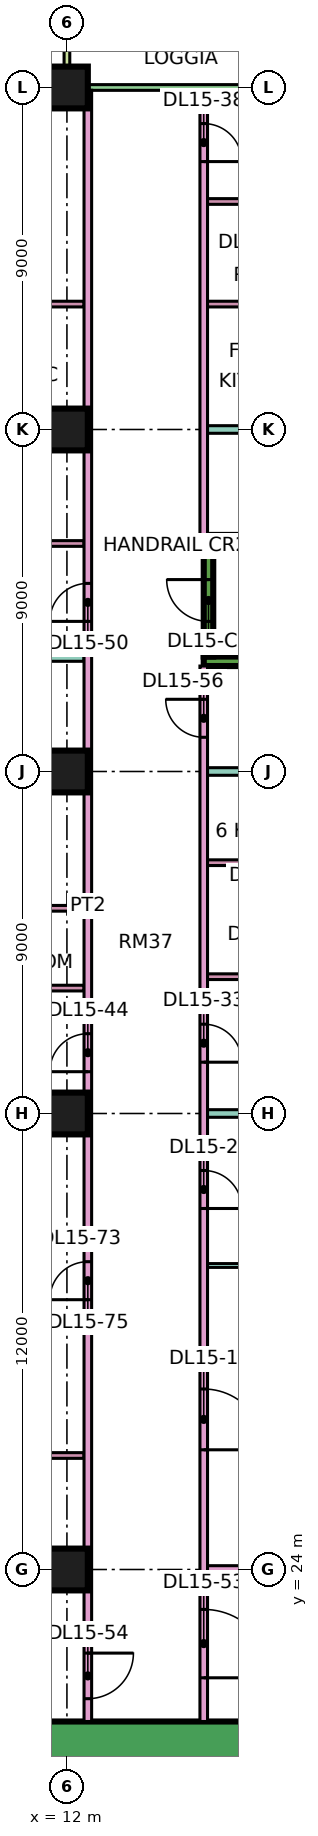
"""IFC4 building model, lengths in metres.
Left out: names, types, materials, properties, quantities, classifications, styles, units other than length and angle.
Written with IfcOpenShell. Run it as: python <this file> out.ifc"""

import sys

from ifc_helpers import new_model, si_unit, direction, frame, frame_2d, origin, origin_2d, place, context, subcontext, project, spatial, rectangle, extrude, element, fill, save


model = new_model("IFC4")
c1 = context("Model", 3, precision=1e-05, world=origin(), true_north=direction((0.0, 1.0)))
c2 = subcontext(c1, "Body", "Model", "MODEL_VIEW")
j1 = project(units=[si_unit("LENGTHUNIT", "METRE"), si_unit("PLANEANGLEUNIT", "RADIAN")], contexts=[c1])
p1 = place(None, origin())
s1 = spatial("IfcSite", under=j1, at=p1, CompositionType="ELEMENT")
p2 = place(p1, origin())
s2 = spatial("IfcBuilding", under=s1, at=p2, CompositionType="ELEMENT")
p3 = place(p2, frame((0.0, 0.0, 71.4)))
s3 = spatial("IfcBuildingStorey", under=s2, at=p3, CompositionType="ELEMENT", Elevation=71.4)
for number, where, z_axis, x_axis in (
    (1, (12.0, 24.0, 0.0), (0.0, 0.0, 1.0), (1.0, 0.0, 0.0)),
    (2, (12.0, 36.0, 0.0), (0.0, 0.0, 1.0), (1.0, 0.0, 0.0)),
    (3, (12.0, 45.0, 0.0), (0.0, 0.0, 1.0), (1.0, 0.0, 0.0)),
    (4, (12.0, 54.0, 0.0), (0.0, 0.0, 1.0), (1.0, 0.0, 0.0)),
    (5, (12.0, 63.0, 0.0), (0.0, 0.0, 1.0), (1.0, 0.0, 0.0)),
):
    element("IfcColumn", number, at=place(p3, frame(where, z_axis=z_axis, x_axis=x_axis)), inside=s3, PredefinedType="COLUMN", context=c2, shape_type="SweptSolid", body=[
        extrude(rectangle(XDim=1.1, YDim=1.1, at=origin_2d()), origin(), (0.0, 0.0, 1.0), 3.75),
    ])
p4 = place(p3, frame((9.0, 19.45, 0.0), z_axis=(0.0, 0.0, 1.0), x_axis=(1.0, 0.0, 0.0)))
e6 = element("IfcWall", 6, at=p4, inside=s3, PredefinedType="SHEAR", context=c2, shape_type="SweptSolid", body=[
    extrude(rectangle(XDim=25.0, YDim=1.1, at=frame_2d((12.5, 0.0))), origin(), (0.0, 0.0, 1.0), 3.75),
])
p5 = place(p4, frame((19.1, 0.0, 0.0)))
e7 = element("IfcOpeningElement", 7, at=p5, cuts=e6, PredefinedType="OPENING", context=c2, shape_type="SweptSolid", body=[
    extrude(rectangle(XDim=1.8, YDim=2.4, at=frame_2d((0.9, 1.2))), frame((0.0, 0.56, 0.0), z_axis=(0.0, -1.0, 0.0), x_axis=(1.0, 0.0, 0.0)), (0.0, 0.0, 1.0), 1.12),
])
for number, where, z_axis, x_axis in (
    (8, (15.6, 47.9, 0.0), (0.0, 0.0, 1.0), (1.0, 0.0, 0.0)),
    (9, (15.6, 51.1, 0.0), (0.0, 0.0, 1.0), (1.0, 0.0, 0.0)),
):
    element("IfcWall", number, at=place(p3, frame(where, z_axis=z_axis, x_axis=x_axis)), inside=s3, PredefinedType="SHEAR", context=c2, shape_type="SweptSolid", body=[
        extrude(rectangle(XDim=7.0, YDim=0.25, at=frame_2d((3.5, 0.0))), origin(), (0.0, 0.0, 1.0), 3.75),
    ])
p6 = place(p3, frame((15.725, 48.025, 0.0), z_axis=(0.0, 0.0, 1.0), x_axis=(0.0, 1.0, 0.0)))
e10 = element("IfcWall", 10, at=p6, inside=s3, PredefinedType="SHEAR", context=c2, shape_type="SweptSolid", body=[
    extrude(rectangle(XDim=2.95, YDim=0.25, at=frame_2d((1.475, 0.0))), origin(), (0.0, 0.0, 1.0), 3.75),
])
p7 = place(p6, frame((0.925, 0.0, 0.0)))
e11 = element("IfcOpeningElement", 11, at=p7, cuts=e10, PredefinedType="OPENING", context=c2, shape_type="SweptSolid", body=[
    extrude(rectangle(XDim=1.1, YDim=2.2, at=frame_2d((0.55, 1.1))), frame((0.0, 0.135, 0.0), z_axis=(0.0, -1.0, 0.0), x_axis=(1.0, 0.0, 0.0)), (0.0, 0.0, 1.0), 0.27),
])
p8 = place(p3, frame((22.425, 63.0, 0.0), z_axis=(0.0, 0.0, 1.0), x_axis=(-1.0, 0.0, 0.0)))
e12 = element("IfcWall", 12, at=p8, inside=s3, PredefinedType="SOLIDWALL", context=c2, shape_type="SweptSolid", body=[
    extrude(rectangle(XDim=10.35, YDim=0.15, at=frame_2d((5.175, 0.0))), origin(), (0.0, 0.0, 1.0), 3.35),
])
p9 = place(p8, frame((2.512, 0.0, 0.0)))
e13 = element("IfcOpeningElement", 13, at=p9, cuts=e12, PredefinedType="OPENING", context=c2, shape_type="SweptSolid", body=[
    extrude(rectangle(XDim=1.8, YDim=2.4, at=frame_2d((0.9, 1.2))), frame((0.0, 0.085, 0.0), z_axis=(0.0, -1.0, 0.0), x_axis=(1.0, 0.0, 0.0)), (0.0, 0.0, 1.0), 0.17),
])
p10 = place(p3, frame((12.0, 64.5, 0.0), z_axis=(0.0, 0.0, 1.0), x_axis=(0.0, -1.0, 0.0)))
e14 = element("IfcWall", 14, at=p10, inside=s3, PredefinedType="SOLIDWALL", context=c2, shape_type="SweptSolid", body=[
    extrude(rectangle(XDim=1.5, YDim=0.15, at=frame_2d((0.75, 0.0))), origin(), (0.0, 0.0, 1.0), 3.35),
])
p11 = place(p3, frame((0.0, 36.0, 0.0), z_axis=(0.0, 0.0, 1.0), x_axis=(1.0, 0.0, 0.0)))
e15 = element("IfcWall", 15, at=p11, inside=s3, PredefinedType="PARTITIONING", context=c2, shape_type="SweptSolid", body=[
    extrude(rectangle(XDim=12.45, YDim=0.2, at=frame_2d((6.225, 0.0))), origin(), (0.0, 0.0, 1.0), 3.35),
])
p12 = place(p3, frame((0.0, 48.0, 0.0), z_axis=(0.0, 0.0, 1.0), x_axis=(1.0, 0.0, 0.0)))
e16 = element("IfcWall", 16, at=p12, inside=s3, PredefinedType="PARTITIONING", context=c2, shape_type="SweptSolid", body=[
    extrude(rectangle(XDim=12.45, YDim=0.2, at=frame_2d((6.225, 0.0))), origin(), (0.0, 0.0, 1.0), 3.35),
])
p13 = place(p3, frame((0.074, 22.4, 0.0), z_axis=(0.0, 0.0, 1.0), x_axis=(1.0, 0.0, 0.0)))
e17 = element("IfcWall", 17, at=p13, inside=s3, PredefinedType="PARTITIONING", context=c2, shape_type="SweptSolid", body=[
    extrude(rectangle(XDim=12.376, YDim=0.2, at=frame_2d((6.188, 0.0))), origin(), (0.0, 0.0, 1.0), 3.35),
])
p14 = place(p3, frame((7.7, 32.7, 0.0), z_axis=(0.0, 0.0, 1.0), x_axis=(1.0, 0.0, 0.0)))
e18 = element("IfcWall", 18, at=p14, inside=s3, PredefinedType="PARTITIONING", context=c2, shape_type="SweptSolid", body=[
    extrude(rectangle(XDim=4.75, YDim=0.1, at=frame_2d((2.375, 0.0))), origin(), (0.0, 0.0, 1.0), 3.35),
])
p15 = place(p14, frame((2.0, 0.0, 0.0)))
e19 = element("IfcOpeningElement", 19, at=p15, cuts=e18, PredefinedType="OPENING", context=c2, shape_type="SweptSolid", body=[
    extrude(rectangle(XDim=0.9, YDim=2.1, at=frame_2d((0.45, 1.05))), frame((0.0, 0.06, 0.0), z_axis=(0.0, -1.0, 0.0), x_axis=(1.0, 0.0, 0.0)), (0.0, 0.0, 1.0), 0.12),
])
p16 = place(p3, frame((7.825, 27.0, 0.0), z_axis=(0.0, 0.0, 1.0), x_axis=(1.0, 0.0, 0.0)))
e20 = element("IfcWall", 20, at=p16, inside=s3, PredefinedType="PARTITIONING", context=c2, shape_type="SweptSolid", body=[
    extrude(rectangle(XDim=4.625, YDim=0.15, at=frame_2d((2.312, 0.0))), origin(), (0.0, 0.0, 1.0), 3.35),
])
p17 = place(p3, frame((7.825, 30.6, 0.0), z_axis=(0.0, 0.0, 1.0), x_axis=(1.0, 0.0, 0.0)))
e21 = element("IfcWall", 21, at=p17, inside=s3, PredefinedType="PARTITIONING", context=c2, shape_type="SweptSolid", body=[
    extrude(rectangle(XDim=4.625, YDim=0.15, at=frame_2d((2.312, 0.0))), origin(), (0.0, 0.0, 1.0), 3.35),
])
p18 = place(p17, frame((1.875, 0.0, 0.0)))
e22 = element("IfcOpeningElement", 22, at=p18, cuts=e21, PredefinedType="OPENING", context=c2, shape_type="SweptSolid", body=[
    extrude(rectangle(XDim=0.8, YDim=2.1, at=frame_2d((0.4, 1.05))), frame((0.0, 0.085, 0.0), z_axis=(0.0, -1.0, 0.0), x_axis=(1.0, 0.0, 0.0)), (0.0, 0.0, 1.0), 0.17),
])
for number, where, z_axis, x_axis in (
    (23, (7.825, 51.0, 0.0), (0.0, 0.0, 1.0), (1.0, 0.0, 0.0)),
    (24, (7.825, 54.3, 0.0), (0.0, 0.0, 1.0), (1.0, 0.0, 0.0)),
    (25, (7.825, 57.3, 0.0), (0.0, 0.0, 1.0), (1.0, 0.0, 0.0)),
):
    element("IfcWall", number, at=place(p3, frame(where, z_axis=z_axis, x_axis=x_axis)), inside=s3, PredefinedType="PARTITIONING", context=c2, shape_type="SweptSolid", body=[
        extrude(rectangle(XDim=4.625, YDim=0.15, at=frame_2d((2.312, 0.0))), origin(), (0.0, 0.0, 1.0), 3.35),
    ])
p19 = place(p3, frame((8.425, 39.3, 0.0), z_axis=(0.0, 0.0, 1.0), x_axis=(1.0, 0.0, 0.0)))
e26 = element("IfcWall", 26, at=p19, inside=s3, PredefinedType="PARTITIONING", context=c2, shape_type="SweptSolid", body=[
    extrude(rectangle(XDim=4.025, YDim=0.15, at=frame_2d((2.012, 0.0))), origin(), (0.0, 0.0, 1.0), 3.35),
])
p20 = place(p19, frame((1.675, 0.0, 0.0)))
e27 = element("IfcOpeningElement", 27, at=p20, cuts=e26, PredefinedType="OPENING", context=c2, shape_type="SweptSolid", body=[
    extrude(rectangle(XDim=0.8, YDim=2.1, at=frame_2d((0.4, 1.05))), frame((0.0, 0.085, 0.0), z_axis=(0.0, -1.0, 0.0), x_axis=(1.0, 0.0, 0.0)), (0.0, 0.0, 1.0), 0.17),
])
p21 = place(p3, frame((8.425, 41.4, 0.0), z_axis=(0.0, 0.0, 1.0), x_axis=(1.0, 0.0, 0.0)))
e28 = element("IfcWall", 28, at=p21, inside=s3, PredefinedType="PARTITIONING", context=c2, shape_type="SweptSolid", body=[
    extrude(rectangle(XDim=4.025, YDim=0.15, at=frame_2d((2.012, 0.0))), origin(), (0.0, 0.0, 1.0), 3.35),
])
p22 = place(p3, frame((12.55, 20.0, 0.0), z_axis=(0.0, 0.0, 1.0), x_axis=(0.0, 1.0, 0.0)))
e29 = element("IfcWall", 29, at=p22, inside=s3, PredefinedType="PARTITIONING", context=c2, shape_type="SweptSolid", body=[
    extrude(rectangle(XDim=42.926, YDim=0.2, at=frame_2d((21.463, 0.0))), origin(), (0.0, 0.0, 1.0), 3.35),
])
p23 = place(p22, frame((17.1, 0.0, 0.0)))
e30 = element("IfcOpeningElement", 30, at=p23, cuts=e29, PredefinedType="OPENING", context=c2, shape_type="SweptSolid", body=[
    extrude(rectangle(XDim=1.0, YDim=2.1, at=frame_2d((0.5, 1.05))), frame((0.0, 0.11, 0.0), z_axis=(0.0, -1.0, 0.0), x_axis=(1.0, 0.0, 0.0)), (0.0, 0.0, 1.0), 0.22),
])
p24 = place(p22, frame((28.95, 0.0, 0.0)))
e31 = element("IfcOpeningElement", 31, at=p24, cuts=e29, PredefinedType="OPENING", context=c2, shape_type="SweptSolid", body=[
    extrude(rectangle(XDim=1.0, YDim=2.1, at=frame_2d((0.5, 1.05))), frame((0.0, 0.11, 0.0), z_axis=(0.0, -1.0, 0.0), x_axis=(1.0, 0.0, 0.0)), (0.0, 0.0, 1.0), 0.22),
])
p25 = place(p22, frame((0.6, 0.0, 0.0)))
e32 = element("IfcOpeningElement", 32, at=p25, cuts=e29, PredefinedType="OPENING", context=c2, shape_type="SweptSolid", body=[
    extrude(rectangle(XDim=1.2, YDim=2.1, at=frame_2d((0.6, 1.05))), frame((0.0, 0.11, 0.0), z_axis=(0.0, -1.0, 0.0), x_axis=(1.0, 0.0, 0.0)), (0.0, 0.0, 1.0), 0.22),
])
p26 = place(p22, frame((11.1, 0.0, 0.0)))
e33 = element("IfcOpeningElement", 33, at=p26, cuts=e29, PredefinedType="OPENING", context=c2, shape_type="SweptSolid", body=[
    extrude(rectangle(XDim=1.0, YDim=2.1, at=frame_2d((0.5, 1.05))), frame((0.0, 0.11, 0.0), z_axis=(0.0, -1.0, 0.0), x_axis=(1.0, 0.0, 0.0)), (0.0, 0.0, 1.0), 0.22),
])
p27 = place(p3, frame((15.6, 20.0, 0.0), z_axis=(0.0, 0.0, 1.0), x_axis=(0.0, 1.0, 0.0)))
e34 = element("IfcWall", 34, at=p27, inside=s3, PredefinedType="PARTITIONING", context=c2, shape_type="SweptSolid", body=[
    extrude(rectangle(XDim=27.775, YDim=0.2, at=frame_2d((13.887, 0.0))), origin(), (0.0, 0.0, 1.0), 3.35),
])
p28 = place(p27, frame((7.15, 0.0, 0.0)))
e35 = element("IfcOpeningElement", 35, at=p28, cuts=e34, PredefinedType="OPENING", context=c2, shape_type="SweptSolid", body=[
    extrude(rectangle(XDim=1.6, YDim=2.1, at=frame_2d((0.8, 1.05))), frame((0.0, 0.11, 0.0), z_axis=(0.0, -1.0, 0.0), x_axis=(1.0, 0.0, 0.0)), (0.0, 0.0, 1.0), 0.22),
])
p29 = place(p27, frame((13.5, 0.0, 0.0)))
e36 = element("IfcOpeningElement", 36, at=p29, cuts=e34, PredefinedType="OPENING", context=c2, shape_type="SweptSolid", body=[
    extrude(rectangle(XDim=1.0, YDim=2.1, at=frame_2d((0.5, 1.05))), frame((0.0, 0.11, 0.0), z_axis=(0.0, -1.0, 0.0), x_axis=(1.0, 0.0, 0.0)), (0.0, 0.0, 1.0), 0.22),
])
p30 = place(p27, frame((17.35, 0.0, 0.0)))
e37 = element("IfcOpeningElement", 37, at=p30, cuts=e34, PredefinedType="OPENING", context=c2, shape_type="SweptSolid", body=[
    extrude(rectangle(XDim=1.0, YDim=2.1, at=frame_2d((0.5, 1.05))), frame((0.0, 0.11, 0.0), z_axis=(0.0, -1.0, 0.0), x_axis=(1.0, 0.0, 0.0)), (0.0, 0.0, 1.0), 0.22),
])
p31 = place(p27, frame((1.15, 0.0, 0.0)))
e38 = element("IfcOpeningElement", 38, at=p31, cuts=e34, PredefinedType="OPENING", context=c2, shape_type="SweptSolid", body=[
    extrude(rectangle(XDim=1.8, YDim=2.1, at=frame_2d((0.9, 1.05))), frame((0.0, 0.11, 0.0), z_axis=(0.0, -1.0, 0.0), x_axis=(1.0, 0.0, 0.0)), (0.0, 0.0, 1.0), 0.22),
])
p32 = place(p27, frame((25.9, 0.0, 0.0)))
e39 = element("IfcOpeningElement", 39, at=p32, cuts=e34, PredefinedType="OPENING", context=c2, shape_type="SweptSolid", body=[
    extrude(rectangle(XDim=1.0, YDim=2.1, at=frame_2d((0.5, 1.05))), frame((0.0, 0.11, 0.0), z_axis=(0.0, -1.0, 0.0), x_axis=(1.0, 0.0, 0.0)), (0.0, 0.0, 1.0), 0.22),
])
p33 = place(p3, frame((15.6, 51.225, 0.0), z_axis=(0.0, 0.0, 1.0), x_axis=(0.0, 1.0, 0.0)))
e40 = element("IfcWall", 40, at=p33, inside=s3, PredefinedType="PARTITIONING", context=c2, shape_type="SweptSolid", body=[
    extrude(rectangle(XDim=11.701, YDim=0.2, at=frame_2d((5.851, 0.0))), origin(), (0.0, 0.0, 1.0), 3.35),
])
p34 = place(p33, frame((9.825, 0.0, 0.0)))
e41 = element("IfcOpeningElement", 41, at=p34, cuts=e40, PredefinedType="OPENING", context=c2, shape_type="SweptSolid", body=[
    extrude(rectangle(XDim=1.0, YDim=2.1, at=frame_2d((0.5, 1.05))), frame((0.0, 0.11, 0.0), z_axis=(0.0, -1.0, 0.0), x_axis=(1.0, 0.0, 0.0)), (0.0, 0.0, 1.0), 0.22),
])
p35 = place(p3, frame((15.7, 24.0, 0.0), z_axis=(0.0, 0.0, 1.0), x_axis=(1.0, 0.0, 0.0)))
e42 = element("IfcWall", 42, at=p35, inside=s3, PredefinedType="PARTITIONING", context=c2, shape_type="SweptSolid", body=[
    extrude(rectangle(XDim=5.8, YDim=0.2, at=frame_2d((2.9, 0.0))), origin(), (0.0, 0.0, 1.0), 3.35),
])
p36 = place(p3, frame((15.7, 32.0, 0.0), z_axis=(0.0, 0.0, 1.0), x_axis=(1.0, 0.0, 0.0)))
e43 = element("IfcWall", 43, at=p36, inside=s3, PredefinedType="PARTITIONING", context=c2, shape_type="SweptSolid", body=[
    extrude(rectangle(XDim=5.8, YDim=0.1, at=frame_2d((2.9, 0.0))), origin(), (0.0, 0.0, 1.0), 3.35),
])
p37 = place(p3, frame((15.7, 36.0, 0.0), z_axis=(0.0, 0.0, 1.0), x_axis=(1.0, 0.0, 0.0)))
e44 = element("IfcWall", 44, at=p37, inside=s3, PredefinedType="PARTITIONING", context=c2, shape_type="SweptSolid", body=[
    extrude(rectangle(XDim=8.3, YDim=0.2, at=frame_2d((4.15, 0.0))), origin(), (0.0, 0.0, 1.0), 3.35),
])
p38 = place(p3, frame((15.7, 39.6, 0.0), z_axis=(0.0, 0.0, 1.0), x_axis=(1.0, 0.0, 0.0)))
e45 = element("IfcWall", 45, at=p38, inside=s3, PredefinedType="PARTITIONING", context=c2, shape_type="SweptSolid", body=[
    extrude(rectangle(XDim=3.125, YDim=0.15, at=frame_2d((1.562, 0.0))), origin(), (0.0, 0.0, 1.0), 3.35),
])
p39 = place(p38, frame((1.2, 0.0, 0.0)))
e46 = element("IfcOpeningElement", 46, at=p39, cuts=e45, PredefinedType="OPENING", context=c2, shape_type="SweptSolid", body=[
    extrude(rectangle(XDim=0.8, YDim=2.1, at=frame_2d((0.4, 1.05))), frame((0.0, 0.085, 0.0), z_axis=(0.0, -1.0, 0.0), x_axis=(1.0, 0.0, 0.0)), (0.0, 0.0, 1.0), 0.17),
])
p40 = place(p3, frame((15.7, 42.6, 0.0), z_axis=(0.0, 0.0, 1.0), x_axis=(1.0, 0.0, 0.0)))
e47 = element("IfcWall", 47, at=p40, inside=s3, PredefinedType="PARTITIONING", context=c2, shape_type="SweptSolid", body=[
    extrude(rectangle(XDim=3.125, YDim=0.15, at=frame_2d((1.562, 0.0))), origin(), (0.0, 0.0, 1.0), 3.35),
])
p41 = place(p3, frame((15.7, 45.0, 0.0), z_axis=(0.0, 0.0, 1.0), x_axis=(1.0, 0.0, 0.0)))
e48 = element("IfcWall", 48, at=p41, inside=s3, PredefinedType="PARTITIONING", context=c2, shape_type="SweptSolid", body=[
    extrude(rectangle(XDim=8.226, YDim=0.2, at=frame_2d((4.113, 0.0))), origin(), (0.0, 0.0, 1.0), 3.35),
])
p42 = place(p3, frame((15.7, 54.0, 0.0), z_axis=(0.0, 0.0, 1.0), x_axis=(1.0, 0.0, 0.0)))
e49 = element("IfcWall", 49, at=p42, inside=s3, PredefinedType="PARTITIONING", context=c2, shape_type="SweptSolid", body=[
    extrude(rectangle(XDim=8.3, YDim=0.2, at=frame_2d((4.15, 0.0))), origin(), (0.0, 0.0, 1.0), 3.35),
])
p43 = place(p3, frame((15.7, 57.3, 0.0), z_axis=(0.0, 0.0, 1.0), x_axis=(1.0, 0.0, 0.0)))
e50 = element("IfcWall", 50, at=p43, inside=s3, PredefinedType="PARTITIONING", context=c2, shape_type="SweptSolid", body=[
    extrude(rectangle(XDim=2.825, YDim=0.15, at=frame_2d((1.413, 0.0))), origin(), (0.0, 0.0, 1.0), 3.35),
])
p44 = place(p3, frame((15.7, 60.0, 0.0), z_axis=(0.0, 0.0, 1.0), x_axis=(1.0, 0.0, 0.0)))
e51 = element("IfcWall", 51, at=p44, inside=s3, PredefinedType="PARTITIONING", context=c2, shape_type="SweptSolid", body=[
    extrude(rectangle(XDim=2.825, YDim=0.15, at=frame_2d((1.413, 0.0))), origin(), (0.0, 0.0, 1.0), 3.35),
])
p45 = place(p44, frame((0.95, 0.0, 0.0)))
e52 = element("IfcOpeningElement", 52, at=p45, cuts=e51, PredefinedType="OPENING", context=c2, shape_type="SweptSolid", body=[
    extrude(rectangle(XDim=0.8, YDim=2.1, at=frame_2d((0.4, 1.05))), frame((0.0, 0.085, 0.0), z_axis=(0.0, -1.0, 0.0), x_axis=(1.0, 0.0, 0.0)), (0.0, 0.0, 1.0), 0.17),
])
p46 = place(p7, frame((1.1, 0.0, 0.0), z_axis=(0.0, 0.0, 1.0), x_axis=(-1.0, 0.0, 0.0)))
e53 = element("IfcDoor", 53, at=p46, inside=s3, OperationType="SINGLE_SWING_RIGHT", PredefinedType="DOOR", context=c2, shape_type="SweptSolid", body=[
    extrude(rectangle(XDim=1.1, YDim=2.2, at=frame_2d((0.55, 1.1))), frame((0.0, 0.025, 0.0), z_axis=(0.0, -1.0, 0.0), x_axis=(1.0, 0.0, 0.0)), (0.0, 0.0, 1.0), 0.05),
])
fill(e11, e53)
p47 = place(p28, frame((1.6, 0.0, 0.0), z_axis=(0.0, 0.0, 1.0), x_axis=(-1.0, 0.0, 0.0)))
e54 = element("IfcDoor", 54, at=p47, inside=s3, OperationType="DOUBLE_DOOR_SINGLE_SWING", PredefinedType="DOOR", context=c2, shape_type="SweptSolid", body=[
    extrude(rectangle(XDim=1.6, YDim=2.1, at=frame_2d((0.8, 1.05))), frame((0.0, 0.025, 0.0), z_axis=(0.0, -1.0, 0.0), x_axis=(1.0, 0.0, 0.0)), (0.0, 0.0, 1.0), 0.05),
])
fill(e35, e54)
p48 = place(p29, frame((1.0, 0.0, 0.0), z_axis=(0.0, 0.0, 1.0), x_axis=(-1.0, 0.0, 0.0)))
e55 = element("IfcDoor", 55, at=p48, inside=s3, OperationType="SINGLE_SWING_LEFT", PredefinedType="DOOR", context=c2, shape_type="SweptSolid", body=[
    extrude(rectangle(XDim=1.0, YDim=2.1, at=frame_2d((0.5, 1.05))), frame((0.0, 0.025, 0.0), z_axis=(0.0, -1.0, 0.0), x_axis=(1.0, 0.0, 0.0)), (0.0, 0.0, 1.0), 0.05),
])
fill(e36, e55)
p49 = place(p30, frame((1.0, 0.0, 0.0), z_axis=(0.0, 0.0, 1.0), x_axis=(-1.0, 0.0, 0.0)))
e56 = element("IfcDoor", 56, at=p49, inside=s3, OperationType="SINGLE_SWING_LEFT", PredefinedType="DOOR", context=c2, shape_type="SweptSolid", body=[
    extrude(rectangle(XDim=1.0, YDim=2.1, at=frame_2d((0.5, 1.05))), frame((0.0, 0.025, 0.0), z_axis=(0.0, -1.0, 0.0), x_axis=(1.0, 0.0, 0.0)), (0.0, 0.0, 1.0), 0.05),
])
fill(e37, e56)
p50 = place(p34, frame((1.0, 0.0, 0.0), z_axis=(0.0, 0.0, 1.0), x_axis=(-1.0, 0.0, 0.0)))
e57 = element("IfcDoor", 57, at=p50, inside=s3, OperationType="SINGLE_SWING_LEFT", PredefinedType="DOOR", context=c2, shape_type="SweptSolid", body=[
    extrude(rectangle(XDim=1.0, YDim=2.1, at=frame_2d((0.5, 1.05))), frame((0.0, 0.025, 0.0), z_axis=(0.0, -1.0, 0.0), x_axis=(1.0, 0.0, 0.0)), (0.0, 0.0, 1.0), 0.05),
])
fill(e41, e57)
p51 = place(p23, origin())
e58 = element("IfcDoor", 58, at=p51, inside=s3, OperationType="SINGLE_SWING_LEFT", PredefinedType="DOOR", context=c2, shape_type="SweptSolid", body=[
    extrude(rectangle(XDim=1.0, YDim=2.1, at=frame_2d((0.5, 1.05))), frame((0.0, 0.025, 0.0), z_axis=(0.0, -1.0, 0.0), x_axis=(1.0, 0.0, 0.0)), (0.0, 0.0, 1.0), 0.05),
])
fill(e30, e58)
p52 = place(p24, origin())
e59 = element("IfcDoor", 59, at=p52, inside=s3, OperationType="SINGLE_SWING_LEFT", PredefinedType="DOOR", context=c2, shape_type="SweptSolid", body=[
    extrude(rectangle(XDim=1.0, YDim=2.1, at=frame_2d((0.5, 1.05))), frame((0.0, 0.025, 0.0), z_axis=(0.0, -1.0, 0.0), x_axis=(1.0, 0.0, 0.0)), (0.0, 0.0, 1.0), 0.05),
])
fill(e31, e59)
p53 = place(p31, frame((1.8, 0.0, 0.0), z_axis=(0.0, 0.0, 1.0), x_axis=(-1.0, 0.0, 0.0)))
e60 = element("IfcDoor", 60, at=p53, inside=s3, OperationType="DOUBLE_DOOR_SINGLE_SWING", PredefinedType="DOOR", context=c2, shape_type="SweptSolid", body=[
    extrude(rectangle(XDim=1.8, YDim=2.1, at=frame_2d((0.9, 1.05))), frame((0.0, 0.025, 0.0), z_axis=(0.0, -1.0, 0.0), x_axis=(1.0, 0.0, 0.0)), (0.0, 0.0, 1.0), 0.05),
])
fill(e38, e60)
p54 = place(p25, origin())
e61 = element("IfcDoor", 61, at=p54, inside=s3, OperationType="SINGLE_SWING_RIGHT", PredefinedType="DOOR", context=c2, shape_type="SweptSolid", body=[
    extrude(rectangle(XDim=1.2, YDim=2.1, at=frame_2d((0.6, 1.05))), frame((0.0, 0.025, 0.0), z_axis=(0.0, -1.0, 0.0), x_axis=(1.0, 0.0, 0.0)), (0.0, 0.0, 1.0), 0.05),
])
fill(e32, e61)
p55 = place(p32, frame((1.0, 0.0, 0.0), z_axis=(0.0, 0.0, 1.0), x_axis=(-1.0, 0.0, 0.0)))
e62 = element("IfcDoor", 62, at=p55, inside=s3, OperationType="SINGLE_SWING_RIGHT", PredefinedType="DOOR", context=c2, shape_type="SweptSolid", body=[
    extrude(rectangle(XDim=1.0, YDim=2.1, at=frame_2d((0.5, 1.05))), frame((0.0, 0.025, 0.0), z_axis=(0.0, -1.0, 0.0), x_axis=(1.0, 0.0, 0.0)), (0.0, 0.0, 1.0), 0.05),
])
fill(e39, e62)
p56 = place(p26, origin())
e63 = element("IfcDoor", 63, at=p56, inside=s3, OperationType="SINGLE_SWING_LEFT", PredefinedType="DOOR", context=c2, shape_type="SweptSolid", body=[
    extrude(rectangle(XDim=1.0, YDim=2.1, at=frame_2d((0.5, 1.05))), frame((0.0, 0.025, 0.0), z_axis=(0.0, -1.0, 0.0), x_axis=(1.0, 0.0, 0.0)), (0.0, 0.0, 1.0), 0.05),
])
fill(e33, e63)
save(model, sys.argv[1])
